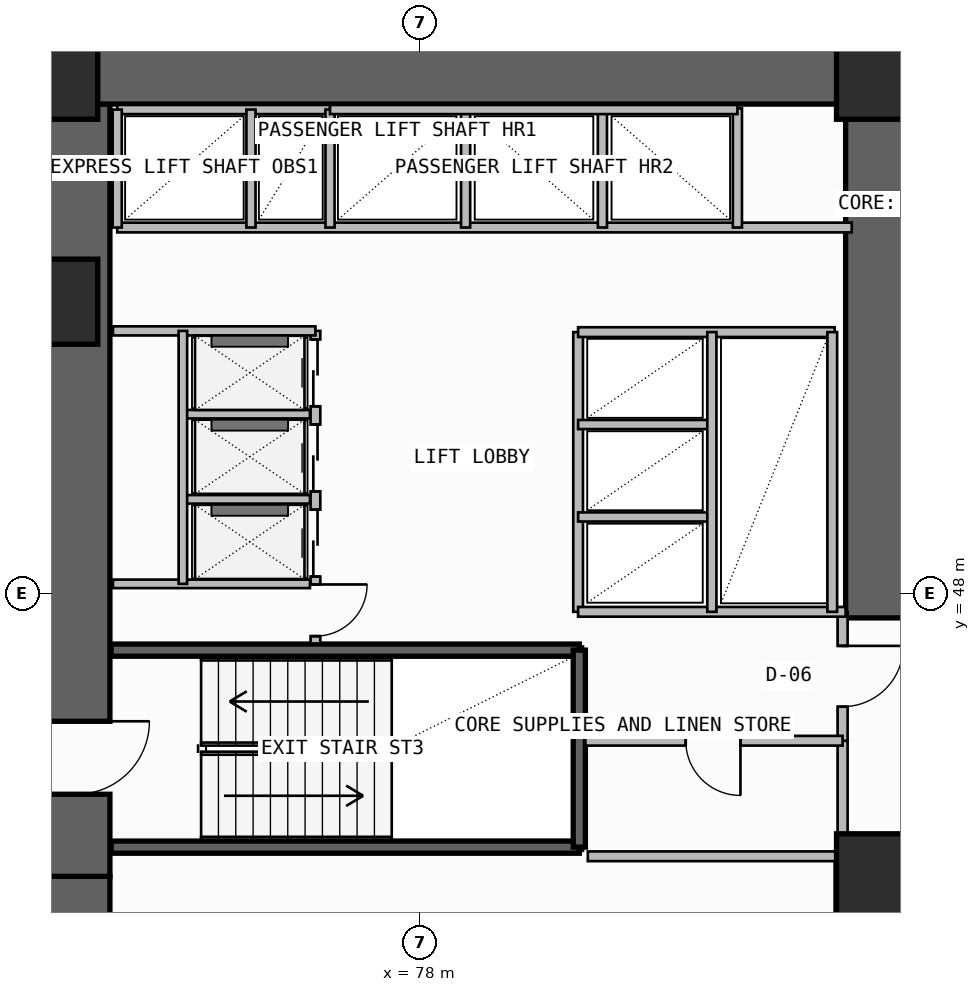
"""IFC4 building model, lengths in metres.
Left out: names, types, materials, properties, quantities, classifications, styles, units other than length and angle.
Written with IfcOpenShell. Run it as: python <this file> out.ifc"""

import sys

from ifc_helpers import new_model, si_unit, direction, frame, frame_2d, origin, origin_2d, place, context, subcontext, project, spatial, rectangle, extrude, element, fill, save


model = new_model("IFC4")
c1 = context("Model", 3, precision=1e-05, world=origin(), true_north=direction((0.0, 1.0)))
c2 = subcontext(c1, "Body", "Model", "MODEL_VIEW")
j1 = project(units=[si_unit("LENGTHUNIT", "METRE"), si_unit("PLANEANGLEUNIT", "RADIAN")], contexts=[c1])
p1 = place(None, origin())
s1 = spatial("IfcSite", under=j1, at=p1, CompositionType="ELEMENT")
p2 = place(p1, origin())
s2 = spatial("IfcBuilding", under=s1, at=p2, CompositionType="ELEMENT")
p3 = place(p2, frame((0.0, 0.0, 59.1)))
s3 = spatial("IfcBuildingStorey", under=s2, at=p3, CompositionType="ELEMENT", Elevation=59.1)
p4 = place(p3, frame((72.35, 35.5, -0.5), z_axis=(0.0, 0.0, 1.0), x_axis=(0.0, 1.0, 0.0)))
e1 = element("IfcWall", 1, at=p4, inside=s3, PredefinedType="SHEAR", context=c2, shape_type="SweptSolid", body=[
    extrude(rectangle(XDim=7.85, YDim=1.1, at=frame_2d((3.925, 0.0))), origin(), (0.0, 0.0, 1.0), 4.3),
])
p5 = place(p4, frame((1.45, 0.0, 0.5)))
e2 = element("IfcOpeningElement", 2, at=p5, cuts=e1, PredefinedType="OPENING", context=c2, shape_type="SweptSolid", body=[
    extrude(rectangle(XDim=1.2, YDim=2.2, at=frame_2d((0.6, 1.1))), frame((0.0, 0.56, 0.0), z_axis=(0.0, -1.0, 0.0), x_axis=(1.0, 0.0, 0.0)), (0.0, 0.0, 1.0), 1.12),
])
p6 = place(p3, frame((72.35, 43.35, -0.5), z_axis=(0.0, 0.0, 1.0), x_axis=(0.0, 1.0, 0.0)))
e3 = element("IfcWall", 3, at=p6, inside=s3, PredefinedType="SHEAR", context=c2, shape_type="SweptSolid", body=[
    extrude(rectangle(XDim=12.7, YDim=1.1, at=frame_2d((6.35, 0.0))), origin(), (0.0, 0.0, 1.0), 4.3),
])
p7 = place(p6, frame((1.35, 0.0, 0.5)))
e4 = element("IfcOpeningElement", 4, at=p7, cuts=e3, PredefinedType="OPENING", context=c2, shape_type="SweptSolid", body=[
    extrude(rectangle(XDim=1.2, YDim=2.2, at=frame_2d((0.6, 1.1))), frame((0.0, 0.56, 0.0), z_axis=(0.0, -1.0, 0.0), x_axis=(1.0, 0.0, 0.0)), (0.0, 0.0, 1.0), 1.12),
])
p8 = place(p3, frame((71.8, 56.6, -0.5), z_axis=(0.0, 0.0, 1.0), x_axis=(1.0, 0.0, 0.0)))
e5 = element("IfcWall", 5, at=p8, inside=s3, PredefinedType="SHEAR", context=c2, shape_type="SweptSolid", body=[
    extrude(rectangle(XDim=14.3, YDim=1.1, at=frame_2d((7.15, 0.0))), origin(), (0.0, 0.0, 1.0), 4.3),
])
p9 = place(p3, frame((85.55, 47.6, -0.5), z_axis=(0.0, 0.0, 1.0), x_axis=(0.0, 1.0, 0.0)))
e6 = element("IfcWall", 6, at=p9, inside=s3, PredefinedType="SHEAR", context=c2, shape_type="SweptSolid", body=[
    extrude(rectangle(XDim=8.45, YDim=1.1, at=frame_2d((4.225, 0.0))), origin(), (0.0, 0.0, 1.0), 4.3),
])
for number, where, z_axis, x_axis in (
    (7, (85.55, 43.35, 0.0), (0.0, 0.0, 1.0), (1.0, 0.0, 0.0)),
    (8, (72.0, 52.8, 0.0), (0.0, 0.0, 1.0), (1.0, 0.0, 0.0)),
    (9, (72.0, 56.5, 0.0), (0.0, 0.0, 1.0), (1.0, 0.0, 0.0)),
    (10, (85.55, 56.5, 0.0), (0.0, 0.0, 1.0), (1.0, 0.0, 0.0)),
):
    element("IfcColumn", number, at=place(p3, frame(where, z_axis=z_axis, x_axis=x_axis)), inside=s3, PredefinedType="COLUMN", context=c2, shape_type="SweptSolid", body=[
        extrude(rectangle(XDim=1.4, YDim=1.4, at=origin_2d()), origin(), (0.0, 0.0, 1.0), 4.2),
    ])
p10 = place(p3, frame((84.92, 38.85, 0.0), z_axis=(0.0, 0.0, 1.0), x_axis=(0.0, 1.0, 0.0)))
e11 = element("IfcWall", 11, at=p10, inside=s3, PredefinedType="SOLIDWALL", context=c2, shape_type="SweptSolid", body=[
    extrude(rectangle(XDim=4.83, YDim=0.2, at=frame_2d((2.415, 0.0))), origin(), (0.0, 0.0, 1.0), 3.8),
])
p11 = place(p10, frame((1.25, 0.0, 0.0)))
e12 = element("IfcOpeningElement", 12, at=p11, cuts=e11, PredefinedType="OPENING", context=c2, shape_type="SweptSolid", body=[
    extrude(rectangle(XDim=1.1, YDim=2.2, at=frame_2d((0.55, 1.1))), frame((0.0, 0.11, 0.0), z_axis=(0.0, -1.0, 0.0), x_axis=(1.0, 0.0, 0.0)), (0.0, 0.0, 1.0), 0.22),
])
for number, where, z_axis, x_axis in (
    (13, (72.92, 43.83, -0.5), (0.0, 0.0, 1.0), (1.0, 0.0, 0.0)),
    (14, (72.92, 47.07, -0.5), (0.0, 0.0, 1.0), (1.0, 0.0, 0.0)),
):
    element("IfcWall", number, at=place(p3, frame(where, z_axis=z_axis, x_axis=x_axis)), inside=s3, PredefinedType="SOLIDWALL", context=c2, shape_type="SweptSolid", body=[
        extrude(rectangle(XDim=7.7, YDim=0.2, at=frame_2d((3.85, 0.0))), origin(), (0.0, 0.0, 1.0), 4.3),
    ])
p12 = place(p3, frame((80.62, 43.83, -0.5), z_axis=(0.0, 0.0, 1.0), x_axis=(0.0, 1.0, 0.0)))
e15 = element("IfcWall", 15, at=p12, inside=s3, PredefinedType="SOLIDWALL", context=c2, shape_type="SweptSolid", body=[
    extrude(rectangle(XDim=3.24, YDim=0.2, at=frame_2d((1.62, 0.0))), origin(), (0.0, 0.0, 1.0), 4.3),
])
p13 = place(p3, frame((84.95, 43.68, 0.0), z_axis=(0.0, 0.0, 1.0), x_axis=(0.0, 1.0, 0.0)))
e16 = element("IfcWall", 16, at=p13, inside=s3, PredefinedType="PLUMBINGWALL", context=c2, shape_type="SweptSolid", body=[
    extrude(rectangle(XDim=1.9, YDim=0.165, at=frame_2d((0.95, 0.0))), origin(), (0.0, 0.0, 1.0), 3.8),
])
p14 = place(p3, frame((84.95, 45.58, 0.0), z_axis=(0.0, 0.0, 1.0), x_axis=(0.0, 1.0, 0.0)))
e17 = element("IfcWall", 17, at=p14, inside=s3, PredefinedType="PARTITIONING", context=c2, shape_type="SweptSolid", body=[
    extrude(rectangle(XDim=2.12, YDim=0.165, at=frame_2d((1.06, 0.0))), origin(), (0.0, 0.0, 1.0), 3.8),
])
p15 = place(p14, frame((0.56, 0.0, 0.0)))
e18 = element("IfcOpeningElement", 18, at=p15, cuts=e17, PredefinedType="OPENING", context=c2, shape_type="SweptSolid", body=[
    extrude(rectangle(XDim=1.0, YDim=2.2, at=frame_2d((0.5, 1.1))), frame((0.0, 0.093, 0.0), z_axis=(0.0, -1.0, 0.0), x_axis=(1.0, 0.0, 0.0)), (0.0, 0.0, 1.0), 0.185),
])
p16 = place(p3, frame((80.72, 45.58, 0.0), z_axis=(0.0, 0.0, 1.0), x_axis=(1.0, 0.0, 0.0)))
e19 = element("IfcWall", 19, at=p16, inside=s3, PredefinedType="PLUMBINGWALL", context=c2, shape_type="SweptSolid", body=[
    extrude(rectangle(XDim=4.23, YDim=0.16, at=frame_2d((2.115, 0.0))), origin(), (0.0, 0.0, 1.0), 3.8),
])
p17 = place(p16, frame((1.65, 0.0, 0.0)))
e20 = element("IfcOpeningElement", 20, at=p17, cuts=e19, PredefinedType="OPENING", context=c2, shape_type="SweptSolid", body=[
    extrude(rectangle(XDim=0.9, YDim=2.1, at=frame_2d((0.45, 1.05))), frame((0.0, 0.09, 0.0), z_axis=(0.0, -1.0, 0.0), x_axis=(1.0, 0.0, 0.0)), (0.0, 0.0, 1.0), 0.18),
])
p18 = place(p3, frame((80.76, 43.68, 0.0), z_axis=(0.0, 0.0, 1.0), x_axis=(1.0, 0.0, 0.0)))
e21 = element("IfcWall", 21, at=p18, inside=s3, PredefinedType="PLUMBINGWALL", context=c2, shape_type="SweptSolid", body=[
    extrude(rectangle(XDim=4.19, YDim=0.16, at=frame_2d((2.095, 0.0))), origin(), (0.0, 0.0, 1.0), 3.8),
])
p19 = place(p3, frame((76.28, 47.18, 0.0), z_axis=(0.0, 0.0, 1.0), x_axis=(0.0, 1.0, 0.0)))
e22 = element("IfcWall", 22, at=p19, inside=s3, PredefinedType="SOLIDWALL", context=c2, shape_type="SweptSolid", body=[
    extrude(rectangle(XDim=5.14, YDim=0.16, at=frame_2d((2.57, 0.0))), origin(), (0.0, 0.0, 1.0), 3.8),
])
p20 = place(p19, frame((1.1, 0.0, 0.0)))
e23 = element("IfcOpeningElement", 23, at=p20, cuts=e22, PredefinedType="OPENING", context=c2, shape_type="SweptSolid", body=[
    extrude(rectangle(XDim=1.1, YDim=2.25, at=frame_2d((0.55, 1.125))), frame((0.0, 0.09, 0.0), z_axis=(0.0, -1.0, 0.0), x_axis=(1.0, 0.0, 0.0)), (0.0, 0.0, 1.0), 0.18),
])
p21 = place(p19, frame((2.5, 0.0, 0.0)))
e24 = element("IfcOpeningElement", 24, at=p21, cuts=e22, PredefinedType="OPENING", context=c2, shape_type="SweptSolid", body=[
    extrude(rectangle(XDim=1.1, YDim=2.25, at=frame_2d((0.55, 1.125))), frame((0.0, 0.09, 0.0), z_axis=(0.0, -1.0, 0.0), x_axis=(1.0, 0.0, 0.0)), (0.0, 0.0, 1.0), 0.18),
])
p22 = place(p19, frame((3.9, 0.0, 0.0)))
e25 = element("IfcOpeningElement", 25, at=p22, cuts=e22, PredefinedType="OPENING", context=c2, shape_type="SweptSolid", body=[
    extrude(rectangle(XDim=1.1, YDim=2.25, at=frame_2d((0.55, 1.125))), frame((0.0, 0.09, 0.0), z_axis=(0.0, -1.0, 0.0), x_axis=(1.0, 0.0, 0.0)), (0.0, 0.0, 1.0), 0.18),
])
p23 = place(p19, frame((0.12, 0.0, 0.0)))
e26 = element("IfcOpeningElement", 26, at=p23, cuts=e22, PredefinedType="OPENING", context=c2, shape_type="SweptSolid", body=[
    extrude(rectangle(XDim=0.85, YDim=2.05, at=frame_2d((0.425, 1.025))), frame((0.0, 0.09, 0.0), z_axis=(0.0, -1.0, 0.0), x_axis=(1.0, 0.0, 0.0)), (0.0, 0.0, 1.0), 0.18),
])
p24 = place(p3, frame((72.95, 52.32, 0.0), z_axis=(0.0, 0.0, 1.0), x_axis=(1.0, 0.0, 0.0)))
e27 = element("IfcWall", 27, at=p24, inside=s3, PredefinedType="SOLIDWALL", context=c2, shape_type="SweptSolid", body=[
    extrude(rectangle(XDim=3.33, YDim=0.15, at=frame_2d((1.665, 0.0))), origin(), (0.0, 0.0, 1.0), 3.8),
])
p25 = place(p3, frame((72.95, 48.16, 0.0), z_axis=(0.0, 0.0, 1.0), x_axis=(1.0, 0.0, 0.0)))
e28 = element("IfcWall", 28, at=p25, inside=s3, PredefinedType="PLUMBINGWALL", context=c2, shape_type="SweptSolid", body=[
    extrude(rectangle(XDim=3.24, YDim=0.14, at=frame_2d((1.62, 0.0))), origin(), (0.0, 0.0, 1.0), 3.8),
])
for number, where, z_axis, x_axis in (
    (29, (74.15, 49.55, 0.0), (0.0, 0.0, 1.0), (1.0, 0.0, 0.0)),
    (30, (74.15, 50.95, 0.0), (0.0, 0.0, 1.0), (1.0, 0.0, 0.0)),
):
    element("IfcWall", number, at=place(p3, frame(where, z_axis=z_axis, x_axis=x_axis)), inside=s3, PredefinedType="PLUMBINGWALL", context=c2, shape_type="SweptSolid", body=[
        extrude(rectangle(XDim=2.04, YDim=0.14, at=frame_2d((1.02, 0.0))), origin(), (0.0, 0.0, 1.0), 3.8),
    ])
p26 = place(p3, frame((74.1, 48.16, 0.0), z_axis=(0.0, 0.0, 1.0), x_axis=(0.0, 1.0, 0.0)))
e31 = element("IfcWall", 31, at=p26, inside=s3, PredefinedType="PLUMBINGWALL", context=c2, shape_type="SweptSolid", body=[
    extrude(rectangle(XDim=4.16, YDim=0.14, at=frame_2d((2.08, 0.0))), origin(), (0.0, 0.0, 1.0), 3.8),
])
p27 = place(p3, frame((80.6, 47.7, 0.0), z_axis=(0.0, 0.0, 1.0), x_axis=(0.0, 1.0, 0.0)))
e32 = element("IfcWall", 32, at=p27, inside=s3, PredefinedType="SOLIDWALL", context=c2, shape_type="SweptSolid", body=[
    extrude(rectangle(XDim=4.6, YDim=0.16, at=frame_2d((2.3, 0.0))), origin(), (0.0, 0.0, 1.0), 3.8),
])
p28 = place(p3, frame((80.6, 47.7, 0.0), z_axis=(0.0, 0.0, 1.0), x_axis=(1.0, 0.0, 0.0)))
e33 = element("IfcWall", 33, at=p28, inside=s3, PredefinedType="SOLIDWALL", context=c2, shape_type="SweptSolid", body=[
    extrude(rectangle(XDim=4.4, YDim=0.16, at=frame_2d((2.2, 0.0))), origin(), (0.0, 0.0, 1.0), 3.8),
])
p29 = place(p3, frame((80.6, 52.3, 0.0), z_axis=(0.0, 0.0, 1.0), x_axis=(1.0, 0.0, 0.0)))
e34 = element("IfcWall", 34, at=p29, inside=s3, PredefinedType="SOLIDWALL", context=c2, shape_type="SweptSolid", body=[
    extrude(rectangle(XDim=4.22, YDim=0.16, at=frame_2d((2.11, 0.0))), origin(), (0.0, 0.0, 1.0), 3.8),
])
for number, where, z_axis, x_axis in (
    (35, (80.6, 49.26, 0.0), (0.0, 0.0, 1.0), (1.0, 0.0, 0.0)),
    (36, (80.6, 50.78, 0.0), (0.0, 0.0, 1.0), (1.0, 0.0, 0.0)),
):
    element("IfcWall", number, at=place(p3, frame(where, z_axis=z_axis, x_axis=x_axis)), inside=s3, PredefinedType="PLUMBINGWALL", context=c2, shape_type="SweptSolid", body=[
        extrude(rectangle(XDim=2.2, YDim=0.15, at=frame_2d((1.1, 0.0))), origin(), (0.0, 0.0, 1.0), 3.8),
    ])
p30 = place(p3, frame((82.8, 47.7, 0.0), z_axis=(0.0, 0.0, 1.0), x_axis=(0.0, 1.0, 0.0)))
e37 = element("IfcWall", 37, at=p30, inside=s3, PredefinedType="PLUMBINGWALL", context=c2, shape_type="SweptSolid", body=[
    extrude(rectangle(XDim=4.6, YDim=0.15, at=frame_2d((2.3, 0.0))), origin(), (0.0, 0.0, 1.0), 3.8),
])
p31 = place(p3, frame((84.78, 47.7, 0.0), z_axis=(0.0, 0.0, 1.0), x_axis=(0.0, 1.0, 0.0)))
e38 = element("IfcWall", 38, at=p31, inside=s3, PredefinedType="SOLIDWALL", context=c2, shape_type="SweptSolid", body=[
    extrude(rectangle(XDim=4.6, YDim=0.16, at=frame_2d((2.3, 0.0))), origin(), (0.0, 0.0, 1.0), 3.8),
])
p32 = place(p3, frame((73.02, 54.02, 0.0), z_axis=(0.0, 0.0, 1.0), x_axis=(1.0, 0.0, 0.0)))
e39 = element("IfcWall", 39, at=p32, inside=s3, PredefinedType="SOLIDWALL", context=c2, shape_type="SweptSolid", body=[
    extrude(rectangle(XDim=12.08, YDim=0.16, at=frame_2d((6.04, 0.0))), origin(), (0.0, 0.0, 1.0), 3.8),
])
p33 = place(p3, frame((73.02, 55.96, 0.0), z_axis=(0.0, 0.0, 1.0), x_axis=(1.0, 0.0, 0.0)))
e40 = element("IfcWall", 40, at=p33, inside=s3, PredefinedType="SOLIDWALL", context=c2, shape_type="SweptSolid", body=[
    extrude(rectangle(XDim=3.5, YDim=0.15, at=frame_2d((1.75, 0.0))), origin(), (0.0, 0.0, 1.0), 3.8),
])
p34 = place(p3, frame((73.02, 54.02, 0.0), z_axis=(0.0, 0.0, 1.0), x_axis=(0.0, 1.0, 0.0)))
e41 = element("IfcWall", 41, at=p34, inside=s3, PredefinedType="PLUMBINGWALL", context=c2, shape_type="SweptSolid", body=[
    extrude(rectangle(XDim=1.94, YDim=0.15, at=frame_2d((0.97, 0.0))), origin(), (0.0, 0.0, 1.0), 3.8),
])
p35 = place(p3, frame((76.52, 54.02, 0.0), z_axis=(0.0, 0.0, 1.0), x_axis=(0.0, 1.0, 0.0)))
e42 = element("IfcWall", 42, at=p35, inside=s3, PredefinedType="SOLIDWALL", context=c2, shape_type="SweptSolid", body=[
    extrude(rectangle(XDim=1.94, YDim=0.15, at=frame_2d((0.97, 0.0))), origin(), (0.0, 0.0, 1.0), 3.8),
])
p36 = place(p3, frame((75.22, 54.02, 0.0), z_axis=(0.0, 0.0, 1.0), x_axis=(0.0, 1.0, 0.0)))
e43 = element("IfcWall", 43, at=p36, inside=s3, PredefinedType="PLUMBINGWALL", context=c2, shape_type="SweptSolid", body=[
    extrude(rectangle(XDim=1.94, YDim=0.15, at=frame_2d((0.97, 0.0))), origin(), (0.0, 0.0, 1.0), 3.8),
])
for number, where, z_axis, x_axis in (
    (44, (78.75, 54.02, 0.0), (0.0, 0.0, 1.0), (0.0, 1.0, 0.0)),
    (45, (81.0, 54.02, 0.0), (0.0, 0.0, 1.0), (0.0, 1.0, 0.0)),
):
    element("IfcWall", number, at=place(p3, frame(where, z_axis=z_axis, x_axis=x_axis)), inside=s3, PredefinedType="PLUMBINGWALL", context=c2, shape_type="SweptSolid", body=[
        extrude(rectangle(XDim=1.96, YDim=0.15, at=frame_2d((0.98, 0.0))), origin(), (0.0, 0.0, 1.0), 3.8),
    ])
p37 = place(p3, frame((83.22, 54.02, 0.0), z_axis=(0.0, 0.0, 1.0), x_axis=(0.0, 1.0, 0.0)))
e46 = element("IfcWall", 46, at=p37, inside=s3, PredefinedType="SOLIDWALL", context=c2, shape_type="SweptSolid", body=[
    extrude(rectangle(XDim=1.96, YDim=0.15, at=frame_2d((0.98, 0.0))), origin(), (0.0, 0.0, 1.0), 3.8),
])
p38 = place(p3, frame((76.52, 55.96, 0.0), z_axis=(0.0, 0.0, 1.0), x_axis=(1.0, 0.0, 0.0)))
e47 = element("IfcWall", 47, at=p38, inside=s3, PredefinedType="SOLIDWALL", context=c2, shape_type="SweptSolid", body=[
    extrude(rectangle(XDim=6.7, YDim=0.15, at=frame_2d((3.35, 0.0))), origin(), (0.0, 0.0, 1.0), 3.8),
])
p39 = place(p7, frame((1.2, 0.0, 0.0), z_axis=(0.0, 0.0, 1.0), x_axis=(-1.0, 0.0, 0.0)))
e48 = element("IfcDoor", 48, at=p39, inside=s3, OperationType="SINGLE_SWING_LEFT", PredefinedType="USERDEFINED", context=c2, shape_type="SweptSolid", body=[
    extrude(rectangle(XDim=1.2, YDim=2.2, at=frame_2d((0.6, 1.1))), frame((0.0, 0.025, 0.0), z_axis=(0.0, -1.0, 0.0), x_axis=(1.0, 0.0, 0.0)), (0.0, 0.0, 1.0), 0.05),
])
fill(e4, e48)
p40 = place(p15, frame((1.0, 0.0, 0.0), z_axis=(0.0, 0.0, 1.0), x_axis=(-1.0, 0.0, 0.0)))
e49 = element("IfcDoor", 49, at=p40, inside=s3, OperationType="SINGLE_SWING_LEFT", PredefinedType="DOOR", context=c2, shape_type="SweptSolid", body=[
    extrude(rectangle(XDim=1.0, YDim=2.2, at=frame_2d((0.5, 1.1))), frame((0.0, 0.025, 0.0), z_axis=(0.0, -1.0, 0.0), x_axis=(1.0, 0.0, 0.0)), (0.0, 0.0, 1.0), 0.05),
])
fill(e18, e49)
p41 = place(p17, frame((0.9, 0.0, 0.0), z_axis=(0.0, 0.0, 1.0), x_axis=(-1.0, 0.0, 0.0)))
e50 = element("IfcDoor", 50, at=p41, inside=s3, OperationType="SINGLE_SWING_LEFT", PredefinedType="DOOR", context=c2, shape_type="SweptSolid", body=[
    extrude(rectangle(XDim=0.9, YDim=2.1, at=frame_2d((0.45, 1.05))), frame((0.0, 0.025, 0.0), z_axis=(0.0, -1.0, 0.0), x_axis=(1.0, 0.0, 0.0)), (0.0, 0.0, 1.0), 0.05),
])
fill(e20, e50)
p42 = place(p20, origin())
e51 = element("IfcDoor", 51, at=p42, inside=s3, OperationType="DOUBLE_DOOR_SLIDING", PredefinedType="DOOR", context=c2, shape_type="SweptSolid", body=[
    extrude(rectangle(XDim=1.1, YDim=2.25, at=frame_2d((0.55, 1.125))), frame((0.0, 0.025, 0.0), z_axis=(0.0, -1.0, 0.0), x_axis=(1.0, 0.0, 0.0)), (0.0, 0.0, 1.0), 0.05),
])
fill(e23, e51)
p43 = place(p21, origin())
e52 = element("IfcDoor", 52, at=p43, inside=s3, OperationType="DOUBLE_DOOR_SLIDING", PredefinedType="DOOR", context=c2, shape_type="SweptSolid", body=[
    extrude(rectangle(XDim=1.1, YDim=2.25, at=frame_2d((0.55, 1.125))), frame((0.0, 0.025, 0.0), z_axis=(0.0, -1.0, 0.0), x_axis=(1.0, 0.0, 0.0)), (0.0, 0.0, 1.0), 0.05),
])
fill(e24, e52)
p44 = place(p22, origin())
e53 = element("IfcDoor", 53, at=p44, inside=s3, OperationType="DOUBLE_DOOR_SLIDING", PredefinedType="DOOR", context=c2, shape_type="SweptSolid", body=[
    extrude(rectangle(XDim=1.1, YDim=2.25, at=frame_2d((0.55, 1.125))), frame((0.0, 0.025, 0.0), z_axis=(0.0, -1.0, 0.0), x_axis=(1.0, 0.0, 0.0)), (0.0, 0.0, 1.0), 0.05),
])
fill(e25, e53)
p45 = place(p23, frame((0.85, 0.0, 0.0), z_axis=(0.0, 0.0, 1.0), x_axis=(-1.0, 0.0, 0.0)))
e54 = element("IfcDoor", 54, at=p45, inside=s3, OperationType="SINGLE_SWING_LEFT", PredefinedType="DOOR", context=c2, shape_type="SweptSolid", body=[
    extrude(rectangle(XDim=0.85, YDim=2.05, at=frame_2d((0.425, 1.025))), frame((0.0, 0.025, 0.0), z_axis=(0.0, -1.0, 0.0), x_axis=(1.0, 0.0, 0.0)), (0.0, 0.0, 1.0), 0.05),
])
fill(e26, e54)
save(model, sys.argv[1])
